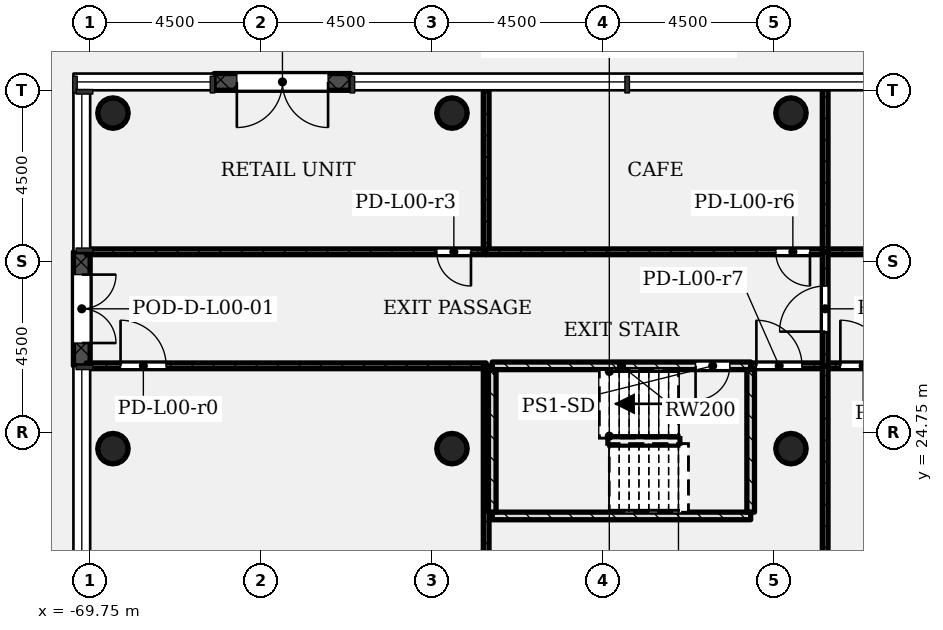
"""IFC4 building model, lengths in metres.
Left out: names, types, materials, properties, quantities, classifications, styles, units other than length and angle.
Written with IfcOpenShell. Run it as: python <this file> out.ifc"""

import sys

from ifc_helpers import new_model, si_unit, direction, frame, frame_2d, origin, origin_2d, place, context, subcontext, project, spatial, rectangle, hollow_circle, extrude, element, fill, save


model = new_model("IFC4")
c1 = context("Model", 3, precision=1e-05, world=origin(), true_north=direction((0.0, 1.0)))
c2 = subcontext(c1, "Body", "Model", "MODEL_VIEW")
j1 = project(units=[si_unit("LENGTHUNIT", "METRE"), si_unit("PLANEANGLEUNIT", "RADIAN")], contexts=[c1])
p1 = place(None, origin())
s1 = spatial("IfcSite", under=j1, at=p1, CompositionType="ELEMENT")
p2 = place(p1, origin())
s2 = spatial("IfcBuilding", under=s1, at=p2, CompositionType="ELEMENT")
p3 = place(p2, origin())
s3 = spatial("IfcBuildingStorey", under=s2, at=p3, CompositionType="ELEMENT", Elevation=0.0)
for number, where, z_axis, x_axis in (
    (1, (-69.15, 24.321, -0.4), (0.0, 0.0, 1.0), (1.0, 0.0, 0.0)),
    (2, (-60.23, 24.321, -0.4), (0.0, 0.0, 1.0), (1.0, 0.0, 0.0)),
    (3, (-51.31, 24.321, -0.4), (0.0, 0.0, 1.0), (1.0, 0.0, 0.0)),
    (4, (-69.15, 33.15, -0.4), (0.0, 0.0, 1.0), (1.0, 0.0, 0.0)),
    (5, (-60.23, 33.15, -0.4), (0.0, 0.0, 1.0), (1.0, 0.0, 0.0)),
    (6, (-51.31, 33.15, -0.4), (0.0, 0.0, 1.0), (1.0, 0.0, 0.0)),
):
    element("IfcColumn", number, at=place(p3, frame(where, z_axis=z_axis, x_axis=x_axis)), inside=s3, PredefinedType="COLUMN", context=c2, shape_type="SweptSolid", body=[
        extrude(hollow_circle(Radius=0.4, WallThickness=0.028, at=origin_2d()), origin(), (0.0, 0.0, 1.0), 6.4),
    ])
p4 = place(p3, frame((-62.89, 33.97, 0.0), z_axis=(0.0, 0.0, 1.0), x_axis=(-1.0, 0.0, 0.0)))
e7 = element("IfcWall", 7, at=p4, inside=s3, PredefinedType="STANDARD", context=c2, shape_type="SweptSolid", body=[
    extrude(rectangle(XDim=3.6, YDim=0.44, at=frame_2d((1.8, 0.0))), origin(), (0.0, 0.0, 1.0), 5.7),
])
p5 = place(p4, frame((0.6, 0.0, 0.0)))
e8 = element("IfcOpeningElement", 8, at=p5, cuts=e7, PredefinedType="OPENING", context=c2, shape_type="SweptSolid", body=[
    extrude(rectangle(XDim=2.4, YDim=2.4, at=frame_2d((1.2, 1.2))), frame((0.0, 0.23, 0.0), z_axis=(0.0, -1.0, 0.0), x_axis=(1.0, 0.0, 0.0)), (0.0, 0.0, 1.0), 0.46),
])
p6 = place(p3, frame((-69.97, 29.5, 0.0), z_axis=(0.0, 0.0, 1.0), x_axis=(0.0, -1.0, 0.0)))
e9 = element("IfcWall", 9, at=p6, inside=s3, PredefinedType="STANDARD", context=c2, shape_type="SweptSolid", body=[
    extrude(rectangle(XDim=3.0, YDim=0.44, at=frame_2d((1.5, 0.0))), origin(), (0.0, 0.0, 1.0), 5.7),
])
p7 = place(p6, frame((0.6, 0.0, 0.0)))
e10 = element("IfcOpeningElement", 10, at=p7, cuts=e9, PredefinedType="OPENING", context=c2, shape_type="SweptSolid", body=[
    extrude(rectangle(XDim=1.8, YDim=2.1, at=frame_2d((0.9, 1.05))), frame((0.0, 0.23, 0.0), z_axis=(0.0, -1.0, 0.0), x_axis=(1.0, 0.0, 0.0)), (0.0, 0.0, 1.0), 0.46),
])
p8 = place(p3, frame((-69.85, 26.5, 0.0), z_axis=(0.0, 0.0, 1.0), x_axis=(1.0, 0.0, 0.0)))
e11 = element("IfcWall", 11, at=p8, inside=s3, PredefinedType="PARTITIONING", context=c2, shape_type="SweptSolid", body=[
    extrude(rectangle(XDim=10.52, YDim=0.15, at=frame_2d((5.26, 0.0))), origin(), (0.0, 0.0, 1.0), 5.58),
])
p9 = place(p8, frame((0.9, 0.0, 0.0)))
e12 = element("IfcOpeningElement", 12, at=p9, cuts=e11, PredefinedType="OPENING", context=c2, shape_type="SweptSolid", body=[
    extrude(rectangle(XDim=1.2, YDim=2.1, at=frame_2d((0.6, 1.05))), frame((0.0, 0.085, 0.0), z_axis=(0.0, -1.0, 0.0), x_axis=(1.0, 0.0, 0.0)), (0.0, 0.0, 1.0), 0.17),
])
p10 = place(p3, frame((-59.33, 26.5, 0.0), z_axis=(0.0, 0.0, 1.0), x_axis=(0.0, -1.0, 0.0)))
e13 = element("IfcWall", 13, at=p10, inside=s3, PredefinedType="PARTITIONING", context=c2, shape_type="SweptSolid", body=[
    extrude(rectangle(XDim=20.5, YDim=0.15, at=frame_2d((10.25, 0.0))), origin(), (0.0, 0.0, 1.0), 5.58),
])
p11 = place(p3, frame((-59.33, 29.5, 0.0), z_axis=(0.0, 0.0, 1.0), x_axis=(-1.0, 0.0, 0.0)))
e14 = element("IfcWall", 14, at=p11, inside=s3, PredefinedType="PARTITIONING", context=c2, shape_type="SweptSolid", body=[
    extrude(rectangle(XDim=10.52, YDim=0.15, at=frame_2d((5.26, 0.0))), origin(), (0.0, 0.0, 1.0), 5.58),
])
p12 = place(p11, frame((0.4, 0.0, 0.0)))
e15 = element("IfcOpeningElement", 15, at=p12, cuts=e14, PredefinedType="OPENING", context=c2, shape_type="SweptSolid", body=[
    extrude(rectangle(XDim=0.9, YDim=2.1, at=frame_2d((0.45, 1.05))), frame((0.0, 0.085, 0.0), z_axis=(0.0, -1.0, 0.0), x_axis=(1.0, 0.0, 0.0)), (0.0, 0.0, 1.0), 0.17),
])
p13 = place(p3, frame((-59.33, 33.85, 0.0), z_axis=(0.0, 0.0, 1.0), x_axis=(0.0, -1.0, 0.0)))
e16 = element("IfcWall", 16, at=p13, inside=s3, PredefinedType="PARTITIONING", context=c2, shape_type="SweptSolid", body=[
    extrude(rectangle(XDim=4.35, YDim=0.15, at=frame_2d((2.175, 0.0))), origin(), (0.0, 0.0, 1.0), 5.58),
])
p14 = place(p3, frame((-50.41, 29.5, 0.0), z_axis=(0.0, 0.0, 1.0), x_axis=(-1.0, 0.0, 0.0)))
e17 = element("IfcWall", 17, at=p14, inside=s3, PredefinedType="PARTITIONING", context=c2, shape_type="SweptSolid", body=[
    extrude(rectangle(XDim=8.92, YDim=0.15, at=frame_2d((4.46, 0.0))), origin(), (0.0, 0.0, 1.0), 5.58),
])
p15 = place(p14, frame((0.4, 0.0, 0.0)))
e18 = element("IfcOpeningElement", 18, at=p15, cuts=e17, PredefinedType="OPENING", context=c2, shape_type="SweptSolid", body=[
    extrude(rectangle(XDim=0.9, YDim=2.1, at=frame_2d((0.45, 1.05))), frame((0.0, 0.085, 0.0), z_axis=(0.0, -1.0, 0.0), x_axis=(1.0, 0.0, 0.0)), (0.0, 0.0, 1.0), 0.17),
])
p16 = place(p3, frame((-52.37, 26.5, 0.0), z_axis=(0.0, 0.0, 1.0), x_axis=(1.0, 0.0, 0.0)))
e19 = element("IfcWall", 19, at=p16, inside=s3, PredefinedType="PARTITIONING", context=c2, shape_type="SweptSolid", body=[
    extrude(rectangle(XDim=1.96, YDim=0.15, at=frame_2d((0.98, 0.0))), origin(), (0.0, 0.0, 1.0), 5.58),
])
p17 = place(p16, frame((0.15, 0.0, 0.0)))
e20 = element("IfcOpeningElement", 20, at=p17, cuts=e19, PredefinedType="OPENING", context=c2, shape_type="SweptSolid", body=[
    extrude(rectangle(XDim=1.2, YDim=2.1, at=frame_2d((0.6, 1.05))), frame((0.0, 0.085, 0.0), z_axis=(0.0, -1.0, 0.0), x_axis=(1.0, 0.0, 0.0)), (0.0, 0.0, 1.0), 0.17),
])
p18 = place(p3, frame((-41.49, 29.5, 0.0), z_axis=(0.0, 0.0, 1.0), x_axis=(-1.0, 0.0, 0.0)))
e21 = element("IfcWall", 21, at=p18, inside=s3, PredefinedType="PARTITIONING", context=c2, shape_type="SweptSolid", body=[
    extrude(rectangle(XDim=8.92, YDim=0.15, at=frame_2d((4.46, 0.0))), origin(), (0.0, 0.0, 1.0), 5.58),
])
p19 = place(p18, frame((0.4, 0.0, 0.0)))
e22 = element("IfcOpeningElement", 22, at=p19, cuts=e21, PredefinedType="OPENING", context=c2, shape_type="SweptSolid", body=[
    extrude(rectangle(XDim=0.9, YDim=2.1, at=frame_2d((0.45, 1.05))), frame((0.0, 0.085, 0.0), z_axis=(0.0, -1.0, 0.0), x_axis=(1.0, 0.0, 0.0)), (0.0, 0.0, 1.0), 0.17),
])
p20 = place(p3, frame((-50.41, 29.5, 0.0), z_axis=(0.0, 0.0, 1.0), x_axis=(0.0, 1.0, 0.0)))
e23 = element("IfcWall", 23, at=p20, inside=s3, PredefinedType="PARTITIONING", context=c2, shape_type="SweptSolid", body=[
    extrude(rectangle(XDim=4.35, YDim=0.15, at=frame_2d((2.175, 0.0))), origin(), (0.0, 0.0, 1.0), 5.58),
])
p21 = place(p3, frame((-50.41, 26.5, 0.0), z_axis=(0.0, 0.0, 1.0), x_axis=(1.0, 0.0, 0.0)))
e24 = element("IfcWall", 24, at=p21, inside=s3, PredefinedType="PARTITIONING", context=c2, shape_type="SweptSolid", body=[
    extrude(rectangle(XDim=8.92, YDim=0.15, at=frame_2d((4.46, 0.0))), origin(), (0.0, 0.0, 1.0), 5.58),
])
p22 = place(p21, frame((0.4, 0.0, 0.0)))
e25 = element("IfcOpeningElement", 25, at=p22, cuts=e24, PredefinedType="OPENING", context=c2, shape_type="SweptSolid", body=[
    extrude(rectangle(XDim=1.2, YDim=2.1, at=frame_2d((0.6, 1.05))), frame((0.0, 0.085, 0.0), z_axis=(0.0, -1.0, 0.0), x_axis=(1.0, 0.0, 0.0)), (0.0, 0.0, 1.0), 0.17),
])
p23 = place(p3, frame((-50.41, 6.75, 0.0), z_axis=(0.0, 0.0, 1.0), x_axis=(0.0, 1.0, 0.0)))
e26 = element("IfcWall", 26, at=p23, inside=s3, PredefinedType="PARTITIONING", context=c2, shape_type="SweptSolid", body=[
    extrude(rectangle(XDim=19.75, YDim=0.15, at=frame_2d((9.875, 0.0))), origin(), (0.0, 0.0, 1.0), 5.58),
])
p24 = place(p3, frame((-50.41, 26.5, 0.0), z_axis=(0.0, 0.0, 1.0), x_axis=(0.0, 1.0, 0.0)))
e27 = element("IfcWall", 27, at=p24, inside=s3, PredefinedType="PARTITIONING", context=c2, shape_type="SweptSolid", body=[
    extrude(rectangle(XDim=3.0, YDim=0.15, at=frame_2d((1.5, 0.0))), origin(), (0.0, 0.0, 1.0), 5.58),
])
p25 = place(p24, frame((0.9, 0.0, 0.0)))
e28 = element("IfcOpeningElement", 28, at=p25, cuts=e27, PredefinedType="OPENING", context=c2, shape_type="SweptSolid", body=[
    extrude(rectangle(XDim=1.2, YDim=2.1, at=frame_2d((0.6, 1.05))), frame((0.0, 0.085, 0.0), z_axis=(0.0, -1.0, 0.0), x_axis=(1.0, 0.0, 0.0)), (0.0, 0.0, 1.0), 0.17),
])
p26 = place(p3, frame((-59.17, 26.5, 0.0), z_axis=(0.0, 0.0, 1.0), x_axis=(1.0, 0.0, 0.0)))
e29 = element("IfcWall", 29, at=p26, inside=s3, PredefinedType="SHEAR", context=c2, shape_type="SweptSolid", body=[
    extrude(rectangle(XDim=6.8, YDim=0.2, at=frame_2d((3.4, 0.0))), origin(), (0.0, 0.0, 1.0), 5.58),
])
p27 = place(p26, frame((5.35, 0.0, 0.0)))
e30 = element("IfcOpeningElement", 30, at=p27, cuts=e29, PredefinedType="OPENING", context=c2, shape_type="SweptSolid", body=[
    extrude(rectangle(XDim=0.9, YDim=2.1, at=frame_2d((0.45, 1.05))), frame((0.0, 0.11, 0.0), z_axis=(0.0, -1.0, 0.0), x_axis=(1.0, 0.0, 0.0)), (0.0, 0.0, 1.0), 0.22),
])
p28 = place(p3, frame((-59.17, 22.55, 0.0), z_axis=(0.0, 0.0, 1.0), x_axis=(1.0, 0.0, 0.0)))
e31 = element("IfcWall", 31, at=p28, inside=s3, PredefinedType="SHEAR", context=c2, shape_type="SweptSolid", body=[
    extrude(rectangle(XDim=6.8, YDim=0.2, at=frame_2d((3.4, 0.0))), origin(), (0.0, 0.0, 1.0), 5.58),
])
for number, where, z_axis, x_axis in (
    (32, (-59.17, 22.65, 0.0), (0.0, 0.0, 1.0), (0.0, 1.0, 0.0)),
    (33, (-52.37, 22.65, 0.0), (0.0, 0.0, 1.0), (0.0, 1.0, 0.0)),
):
    element("IfcWall", number, at=place(p3, frame(where, z_axis=z_axis, x_axis=x_axis)), inside=s3, PredefinedType="SHEAR", context=c2, shape_type="SweptSolid", body=[
        extrude(rectangle(XDim=3.75, YDim=0.2, at=frame_2d((1.875, 0.0))), origin(), (0.0, 0.0, 1.0), 5.58),
    ])
p29 = place(p5, origin())
e34 = element("IfcDoor", 34, at=p29, inside=s3, OperationType="DOUBLE_DOOR_DOUBLE_SWING", PredefinedType="DOOR", context=c2, shape_type="SweptSolid", body=[
    extrude(rectangle(XDim=2.4, YDim=2.4, at=frame_2d((1.2, 1.2))), frame((0.0, 0.025, 0.0), z_axis=(0.0, -1.0, 0.0), x_axis=(1.0, 0.0, 0.0)), (0.0, 0.0, 1.0), 0.05),
])
fill(e8, e34)
p30 = place(p7, origin())
e35 = element("IfcDoor", 35, at=p30, inside=s3, OperationType="DOUBLE_DOOR_DOUBLE_SWING", PredefinedType="DOOR", context=c2, shape_type="SweptSolid", body=[
    extrude(rectangle(XDim=1.8, YDim=2.1, at=frame_2d((0.9, 1.05))), frame((0.0, 0.025, 0.0), z_axis=(0.0, -1.0, 0.0), x_axis=(1.0, 0.0, 0.0)), (0.0, 0.0, 1.0), 0.05),
])
fill(e10, e35)
p31 = place(p9, origin())
e36 = element("IfcDoor", 36, at=p31, inside=s3, OperationType="SINGLE_SWING_RIGHT", PredefinedType="DOOR", context=c2, shape_type="SweptSolid", body=[
    extrude(rectangle(XDim=1.2, YDim=2.1, at=frame_2d((0.6, 1.05))), frame((0.0, 0.025, 0.0), z_axis=(0.0, -1.0, 0.0), x_axis=(1.0, 0.0, 0.0)), (0.0, 0.0, 1.0), 0.05),
])
fill(e12, e36)
p32 = place(p12, origin())
e37 = element("IfcDoor", 37, at=p32, inside=s3, OperationType="SINGLE_SWING_RIGHT", PredefinedType="DOOR", context=c2, shape_type="SweptSolid", body=[
    extrude(rectangle(XDim=0.9, YDim=2.1, at=frame_2d((0.45, 1.05))), frame((0.0, 0.025, 0.0), z_axis=(0.0, -1.0, 0.0), x_axis=(1.0, 0.0, 0.0)), (0.0, 0.0, 1.0), 0.05),
])
fill(e15, e37)
p33 = place(p15, origin())
e38 = element("IfcDoor", 38, at=p33, inside=s3, OperationType="SINGLE_SWING_RIGHT", PredefinedType="DOOR", context=c2, shape_type="SweptSolid", body=[
    extrude(rectangle(XDim=0.9, YDim=2.1, at=frame_2d((0.45, 1.05))), frame((0.0, 0.025, 0.0), z_axis=(0.0, -1.0, 0.0), x_axis=(1.0, 0.0, 0.0)), (0.0, 0.0, 1.0), 0.05),
])
fill(e18, e38)
p34 = place(p17, origin())
e39 = element("IfcDoor", 39, at=p34, inside=s3, OperationType="SINGLE_SWING_RIGHT", PredefinedType="DOOR", context=c2, shape_type="SweptSolid", body=[
    extrude(rectangle(XDim=1.2, YDim=2.1, at=frame_2d((0.6, 1.05))), frame((0.0, 0.025, 0.0), z_axis=(0.0, -1.0, 0.0), x_axis=(1.0, 0.0, 0.0)), (0.0, 0.0, 1.0), 0.05),
])
fill(e20, e39)
p35 = place(p22, origin())
e40 = element("IfcDoor", 40, at=p35, inside=s3, OperationType="SINGLE_SWING_RIGHT", PredefinedType="DOOR", context=c2, shape_type="SweptSolid", body=[
    extrude(rectangle(XDim=1.2, YDim=2.1, at=frame_2d((0.6, 1.05))), frame((0.0, 0.025, 0.0), z_axis=(0.0, -1.0, 0.0), x_axis=(1.0, 0.0, 0.0)), (0.0, 0.0, 1.0), 0.05),
])
fill(e25, e40)
p36 = place(p25, origin())
e41 = element("IfcDoor", 41, at=p36, inside=s3, OperationType="SINGLE_SWING_RIGHT", PredefinedType="DOOR", context=c2, shape_type="SweptSolid", body=[
    extrude(rectangle(XDim=1.2, YDim=2.1, at=frame_2d((0.6, 1.05))), frame((0.0, 0.025, 0.0), z_axis=(0.0, -1.0, 0.0), x_axis=(1.0, 0.0, 0.0)), (0.0, 0.0, 1.0), 0.05),
])
fill(e28, e41)
p37 = place(p27, origin())
e42 = element("IfcDoor", 42, at=p37, inside=s3, OperationType="SINGLE_SWING_LEFT", PredefinedType="DOOR", context=c2, shape_type="SweptSolid", body=[
    extrude(rectangle(XDim=0.9, YDim=2.1, at=frame_2d((0.45, 1.05))), frame((0.0, 0.025, 0.0), z_axis=(0.0, -1.0, 0.0), x_axis=(1.0, 0.0, 0.0)), (0.0, 0.0, 1.0), 0.05),
])
fill(e30, e42)
save(model, sys.argv[1])
